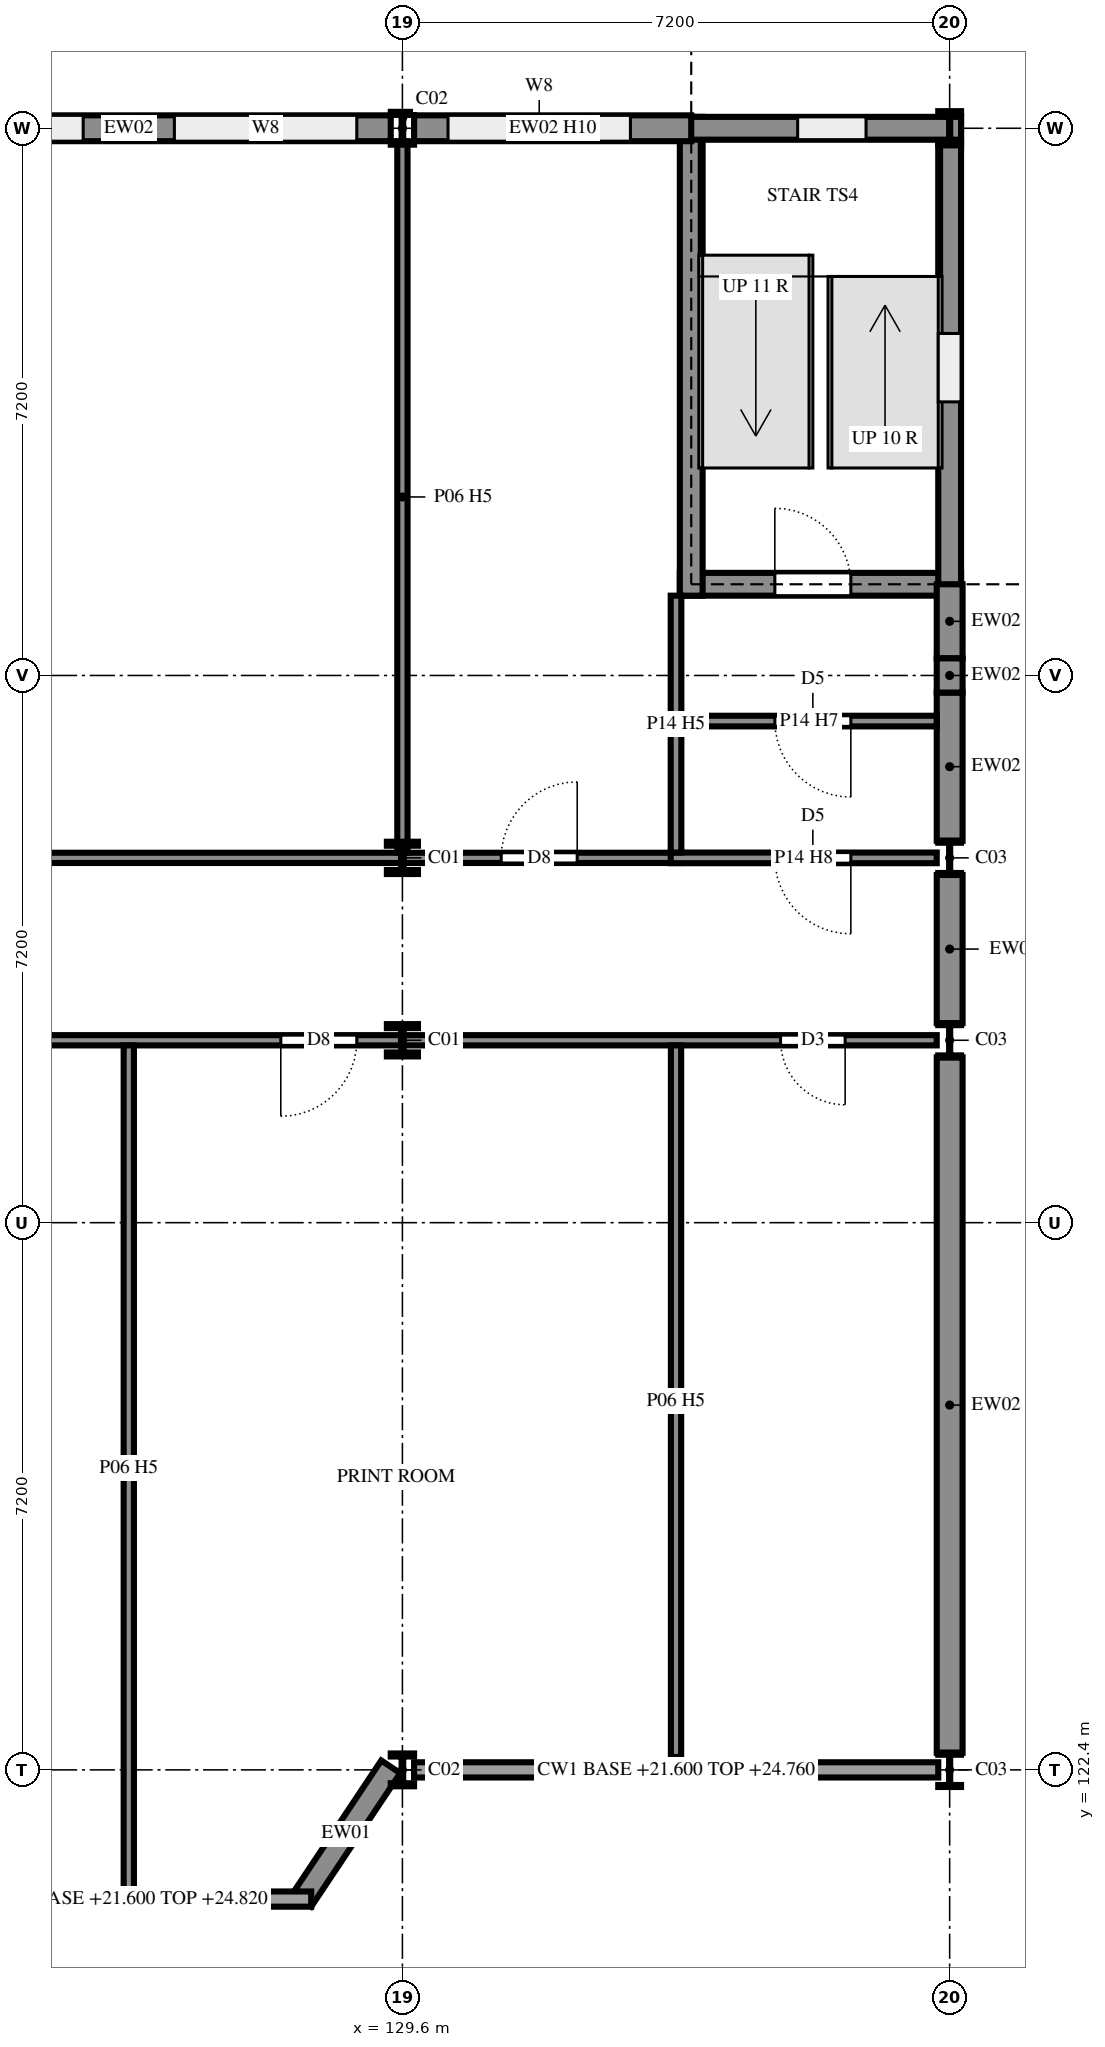
"""IFC4 building model, lengths in metres.
Left out: names, types, materials, properties, quantities, classifications, styles, units other than length and angle.
Written with IfcOpenShell. Run it as: python <this file> out.ifc"""

import sys

from ifc_helpers import new_model, si_unit, direction, frame, frame_2d, origin, origin_2d, place, context, subcontext, project, spatial, rectangle, i_section, extrude, element, fill, save


model = new_model("IFC4")
c1 = context("Model", 3, precision=1e-05, world=origin(), true_north=direction((0.0, 1.0)))
c2 = subcontext(c1, "Body", "Model", "MODEL_VIEW")
j1 = project(units=[si_unit("LENGTHUNIT", "METRE"), si_unit("PLANEANGLEUNIT", "RADIAN")], contexts=[c1])
p1 = place(None, origin())
s1 = spatial("IfcSite", under=j1, at=p1, CompositionType="ELEMENT")
p2 = place(p1, origin())
s2 = spatial("IfcBuilding", under=s1, at=p2, CompositionType="ELEMENT")
p3 = place(p2, frame((0.0, 0.0, 21.6)))
s3 = spatial("IfcBuildingStorey", under=s2, at=p3, CompositionType="ELEMENT", Elevation=21.6)
p4 = place(p3, frame((129.6, 122.4, 0.0), z_axis=(0.0, 0.0, 1.0), x_axis=(1.0, 0.0, 0.0)))
e1 = element("IfcColumn", 1, at=p4, inside=s3, PredefinedType="COLUMN", context=c2, shape_type="SweptSolid", body=[
    extrude(i_section(OverallWidth=0.307, OverallDepth=0.432, WebThickness=0.021, FlangeThickness=0.04, FilletRadius=0.027, at=origin_2d()), origin(), (0.0, 0.0, 1.0), 3.6),
])
for number, where, z_axis, x_axis in (
    (2, (129.6, 132.0, 0.0), (0.0, 0.0, 1.0), (1.0, 0.0, 0.0)),
    (3, (129.6, 134.4, 0.0), (0.0, 0.0, 1.0), (1.0, 0.0, 0.0)),
):
    element("IfcColumn", number, at=place(p3, frame(where, z_axis=z_axis, x_axis=x_axis)), inside=s3, PredefinedType="COLUMN", context=c2, shape_type="SweptSolid", body=[
        extrude(i_section(OverallWidth=0.409, OverallDepth=0.425, WebThickness=0.033, FlangeThickness=0.052, FilletRadius=0.015, at=origin_2d()), origin(), (0.0, 0.0, 1.0), 3.6),
    ])
p5 = place(p3, frame((129.6, 144.0, 0.0), z_axis=(0.0, 0.0, 1.0), x_axis=(1.0, 0.0, 0.0)))
e4 = element("IfcColumn", 4, at=p5, inside=s3, PredefinedType="COLUMN", context=c2, shape_type="SweptSolid", body=[
    extrude(i_section(OverallWidth=0.307, OverallDepth=0.432, WebThickness=0.021, FlangeThickness=0.04, FilletRadius=0.027, at=origin_2d()), origin(), (0.0, 0.0, 1.0), 3.6),
])
for number, where, z_axis, x_axis in (
    (5, (136.8, 122.4, 0.0), (0.0, 0.0, 1.0), (1.0, 0.0, 0.0)),
    (6, (136.8, 132.0, 0.0), (0.0, 0.0, 1.0), (1.0, 0.0, 0.0)),
    (7, (136.8, 134.4, 0.0), (0.0, 0.0, 1.0), (1.0, 0.0, 0.0)),
    (8, (136.8, 144.0, 0.0), (0.0, 0.0, 1.0), (1.0, 0.0, 0.0)),
):
    element("IfcColumn", number, at=place(p3, frame(where, z_axis=z_axis, x_axis=x_axis)), inside=s3, PredefinedType="COLUMN", context=c2, shape_type="SweptSolid", body=[
        extrude(i_section(OverallWidth=0.3, OverallDepth=0.45, WebThickness=0.014, FlangeThickness=0.026, FilletRadius=0.027, at=origin_2d()), origin(), (0.0, 0.0, 1.0), 3.6),
    ])
p6 = place(p3, frame((133.25, 138.0, 0.0), z_axis=(0.0, 0.0, 1.0), x_axis=(1.0, 0.0, 0.0)))
e9 = element("IfcWall", 9, at=p6, inside=s3, PredefinedType="SHEAR", context=c2, shape_type="SweptSolid", body=[
    extrude(rectangle(XDim=3.7, YDim=0.3, at=frame_2d((1.85, 0.0))), origin(), (0.0, 0.0, 1.0), 3.6),
])
p7 = place(p6, frame((1.25, 0.0, 0.0)))
e10 = element("IfcOpeningElement", 10, at=p7, cuts=e9, PredefinedType="OPENING", context=c2, shape_type="SweptSolid", body=[
    extrude(rectangle(XDim=1.0, YDim=2.1, at=frame_2d((0.5, 1.05))), frame((0.0, 0.16, 0.0), z_axis=(0.0, -1.0, 0.0), x_axis=(1.0, 0.0, 0.0)), (0.0, 0.0, 1.0), 0.32),
])
p8 = place(p3, frame((136.8, 137.85, 0.0), z_axis=(0.0, 0.0, 1.0), x_axis=(0.0, 1.0, 0.0)))
e11 = element("IfcWall", 11, at=p8, inside=s3, PredefinedType="SHEAR", context=c2, shape_type="SweptSolid", body=[
    extrude(rectangle(XDim=6.3, YDim=0.3, at=frame_2d((3.15, 0.0))), origin(), (0.0, 0.0, 1.0), 3.6),
])
p9 = place(p8, frame((2.55, 0.0, 0.6)))
e12 = element("IfcOpeningElement", 12, at=p9, cuts=e11, PredefinedType="OPENING", context=c2, shape_type="SweptSolid", body=[
    extrude(rectangle(XDim=0.9, YDim=2.1, at=frame_2d((0.45, 1.05))), frame((0.0, 0.16, 0.0), z_axis=(0.0, -1.0, 0.0), x_axis=(1.0, 0.0, 0.0)), (0.0, 0.0, 1.0), 0.32),
])
p10 = place(p3, frame((133.4, 144.15, 0.0), z_axis=(0.0, 0.0, 1.0), x_axis=(0.0, -1.0, 0.0)))
e13 = element("IfcWall", 13, at=p10, inside=s3, PredefinedType="SHEAR", context=c2, shape_type="SweptSolid", body=[
    extrude(rectangle(XDim=6.3, YDim=0.3, at=frame_2d((3.15, 0.0))), origin(), (0.0, 0.0, 1.0), 3.6),
])
p11 = place(p3, frame((136.95, 144.0, 0.0), z_axis=(0.0, 0.0, 1.0), x_axis=(-1.0, 0.0, 0.0)))
e14 = element("IfcWall", 14, at=p11, inside=s3, PredefinedType="SHEAR", context=c2, shape_type="SweptSolid", body=[
    extrude(rectangle(XDim=3.7, YDim=0.3, at=frame_2d((1.85, 0.0))), origin(), (0.0, 0.0, 1.0), 3.6),
])
p12 = place(p11, frame((1.25, 0.0, 0.6)))
e15 = element("IfcOpeningElement", 15, at=p12, cuts=e14, PredefinedType="OPENING", context=c2, shape_type="SweptSolid", body=[
    extrude(rectangle(XDim=0.9, YDim=2.1, at=frame_2d((0.45, 1.05))), frame((0.0, 0.16, 0.0), z_axis=(0.0, -1.0, 0.0), x_axis=(1.0, 0.0, 0.0)), (0.0, 0.0, 1.0), 0.32),
])
p13 = place(p3, frame((136.8, 122.625, 0.0), z_axis=(0.0, 0.0, 1.0), x_axis=(0.0, 1.0, 0.0)))
e16 = element("IfcWall", 16, at=p13, inside=s3, PredefinedType="SOLIDWALL", context=c2, shape_type="SweptSolid", body=[
    extrude(rectangle(XDim=9.15, YDim=0.34, at=frame_2d((4.575, 0.0))), origin(), (0.0, 0.0, 1.0), 3.06),
])
p14 = place(p3, frame((136.8, 132.225, 0.0), z_axis=(0.0, 0.0, 1.0), x_axis=(0.0, 1.0, 0.0)))
e17 = element("IfcWall", 17, at=p14, inside=s3, PredefinedType="SOLIDWALL", context=c2, shape_type="SweptSolid", body=[
    extrude(rectangle(XDim=1.95, YDim=0.34, at=frame_2d((0.975, 0.0))), origin(), (0.0, 0.0, 1.0), 3.26),
])
p15 = place(p3, frame((136.8, 134.625, 0.0), z_axis=(0.0, 0.0, 1.0), x_axis=(0.0, 1.0, 0.0)))
e18 = element("IfcWall", 18, at=p15, inside=s3, PredefinedType="SOLIDWALL", context=c2, shape_type="SweptSolid", body=[
    extrude(rectangle(XDim=1.95, YDim=0.34, at=frame_2d((0.975, 0.0))), origin(), (0.0, 0.0, 1.0), 3.46),
])
p16 = place(p3, frame((136.8, 137.025, 0.0), z_axis=(0.0, 0.0, 1.0), x_axis=(0.0, 1.0, 0.0)))
e19 = element("IfcWall", 19, at=p16, inside=s3, PredefinedType="SOLIDWALL", context=c2, shape_type="SweptSolid", body=[
    extrude(rectangle(XDim=0.975, YDim=0.34, at=frame_2d((0.488, 0.0))), origin(), (0.0, 0.0, 1.0), 3.46),
])
p17 = place(p3, frame((133.4, 144.0, 0.0), z_axis=(0.0, 0.0, 1.0), x_axis=(-1.0, 0.0, 0.0)))
e20 = element("IfcWall", 20, at=p17, inside=s3, PredefinedType="SOLIDWALL", context=c2, shape_type="SweptSolid", body=[
    extrude(rectangle(XDim=3.646, YDim=0.34, at=frame_2d((1.823, 0.0))), origin(), (0.0, 0.0, 1.0), 3.26),
])
p18 = place(p17, frame((0.8, 0.0, 0.9)))
e21 = element("IfcOpeningElement", 21, at=p18, cuts=e20, PredefinedType="OPENING", context=c2, shape_type="SweptSolid", body=[
    extrude(rectangle(XDim=2.4, YDim=1.8, at=frame_2d((1.2, 0.9))), frame((0.0, 0.18, 0.0), z_axis=(0.0, -1.0, 0.0), x_axis=(1.0, 0.0, 0.0)), (0.0, 0.0, 1.0), 0.36),
])
p19 = place(p3, frame((129.447, 144.0, 0.0), z_axis=(0.0, 0.0, 1.0), x_axis=(-1.0, 0.0, 0.0)))
e22 = element("IfcWall", 22, at=p19, inside=s3, PredefinedType="SOLIDWALL", context=c2, shape_type="SweptSolid", body=[
    extrude(rectangle(XDim=6.893, YDim=0.34, at=frame_2d((3.447, 0.0))), origin(), (0.0, 0.0, 1.0), 3.16),
])
p20 = place(p19, frame((4.046, 0.0, 0.9)))
e23 = element("IfcOpeningElement", 23, at=p20, cuts=e22, PredefinedType="OPENING", context=c2, shape_type="SweptSolid", body=[
    extrude(rectangle(XDim=2.4, YDim=1.8, at=frame_2d((1.2, 0.9))), frame((0.0, 0.18, 0.0), z_axis=(0.0, -1.0, 0.0), x_axis=(1.0, 0.0, 0.0)), (0.0, 0.0, 1.0), 0.36),
])
p21 = place(p19, frame((0.447, 0.0, 0.9)))
e24 = element("IfcOpeningElement", 24, at=p21, cuts=e22, PredefinedType="OPENING", context=c2, shape_type="SweptSolid", body=[
    extrude(rectangle(XDim=2.4, YDim=1.8, at=frame_2d((1.2, 0.9))), frame((0.0, 0.18, 0.0), z_axis=(0.0, -1.0, 0.0), x_axis=(1.0, 0.0, 0.0)), (0.0, 0.0, 1.0), 0.36),
])
p22 = place(p3, frame((129.447, 122.44, 0.0), z_axis=(0.0, 0.0, 1.0), x_axis=(-0.554700196225, -0.832050294338, 0.0)))
e25 = element("IfcWall", 25, at=p22, inside=s3, PredefinedType="SOLIDWALL", context=c2, shape_type="SweptSolid", body=[
    extrude(rectangle(XDim=2.112, YDim=0.3, at=frame_2d((1.056, 0.0))), origin(), (0.0, 0.0, 1.0), 3.22),
])
p23 = place(p3, frame((136.8, 136.575, 0.0), z_axis=(0.0, 0.0, 1.0), x_axis=(0.0, 1.0, 0.0)))
e26 = element("IfcWall", 26, at=p23, inside=s3, PredefinedType="SOLIDWALL", context=c2, shape_type="SweptSolid", body=[
    extrude(rectangle(XDim=0.45, YDim=0.34, at=frame_2d((0.225, 0.0))), origin(), (0.0, 0.0, 1.0), 3.46),
])
p24 = place(p3, frame((108.2, 132.0, 0.0), z_axis=(0.0, 0.0, 1.0), x_axis=(1.0, 0.0, 0.0)))
e27 = element("IfcWall", 27, at=p24, inside=s3, PredefinedType="PARTITIONING", context=c2, shape_type="SweptSolid", body=[
    extrude(rectangle(XDim=28.43, YDim=0.135, at=frame_2d((14.215, 0.0))), origin(), (0.0, 0.0, 1.0), 3.16),
])
p25 = place(p24, frame((26.375, 0.0, 0.0)))
e28 = element("IfcOpeningElement", 28, at=p25, cuts=e27, PredefinedType="OPENING", context=c2, shape_type="SweptSolid", body=[
    extrude(rectangle(XDim=0.85, YDim=2.1, at=frame_2d((0.425, 1.05))), frame((0.0, 0.077, 0.0), z_axis=(0.0, -1.0, 0.0), x_axis=(1.0, 0.0, 0.0)), (0.0, 0.0, 1.0), 0.155),
])
p26 = place(p24, frame((3.4, 0.0, 0.0)))
e29 = element("IfcOpeningElement", 29, at=p26, cuts=e27, PredefinedType="OPENING", context=c2, shape_type="SweptSolid", body=[
    extrude(rectangle(XDim=1.8, YDim=2.1, at=frame_2d((0.9, 1.05))), frame((0.0, 0.077, 0.0), z_axis=(0.0, -1.0, 0.0), x_axis=(1.0, 0.0, 0.0)), (0.0, 0.0, 1.0), 0.155),
])
p27 = place(p24, frame((11.8, 0.0, 0.0)))
e30 = element("IfcOpeningElement", 30, at=p27, cuts=e27, PredefinedType="OPENING", context=c2, shape_type="SweptSolid", body=[
    extrude(rectangle(XDim=1.8, YDim=2.1, at=frame_2d((0.9, 1.05))), frame((0.0, 0.077, 0.0), z_axis=(0.0, -1.0, 0.0), x_axis=(1.0, 0.0, 0.0)), (0.0, 0.0, 1.0), 0.155),
])
p28 = place(p24, frame((19.8, 0.0, 0.0)))
e31 = element("IfcOpeningElement", 31, at=p28, cuts=e27, PredefinedType="OPENING", context=c2, shape_type="SweptSolid", body=[
    extrude(rectangle(XDim=1.0, YDim=2.4, at=frame_2d((0.5, 1.2))), frame((0.0, 0.077, 0.0), z_axis=(0.0, -1.0, 0.0), x_axis=(1.0, 0.0, 0.0)), (0.0, 0.0, 1.0), 0.155),
])
p29 = place(p3, frame((108.2, 134.4, 0.0), z_axis=(0.0, 0.0, 1.0), x_axis=(1.0, 0.0, 0.0)))
e32 = element("IfcWall", 32, at=p29, inside=s3, PredefinedType="PARTITIONING", context=c2, shape_type="SweptSolid", body=[
    extrude(rectangle(XDim=25.07, YDim=0.135, at=frame_2d((12.535, 0.0))), origin(), (0.0, 0.0, 1.0), 3.16),
])
p30 = place(p29, frame((22.7, 0.0, 0.0)))
e33 = element("IfcOpeningElement", 33, at=p30, cuts=e32, PredefinedType="OPENING", context=c2, shape_type="SweptSolid", body=[
    extrude(rectangle(XDim=1.0, YDim=2.4, at=frame_2d((0.5, 1.2))), frame((0.0, 0.077, 0.0), z_axis=(0.0, -1.0, 0.0), x_axis=(1.0, 0.0, 0.0)), (0.0, 0.0, 1.0), 0.155),
])
p31 = place(p3, frame((133.13, 134.4, 0.0), z_axis=(0.0, 0.0, 1.0), x_axis=(1.0, 0.0, 0.0)))
e34 = element("IfcWall", 34, at=p31, inside=s3, PredefinedType="PARTITIONING", context=c2, shape_type="SweptSolid", body=[
    extrude(rectangle(XDim=3.5, YDim=0.14, at=frame_2d((1.75, 0.0))), origin(), (0.0, 0.0, 1.0), 3.16),
])
p32 = place(p31, frame((1.37, 0.0, 0.0)))
e35 = element("IfcOpeningElement", 35, at=p32, cuts=e34, PredefinedType="OPENING", context=c2, shape_type="SweptSolid", body=[
    extrude(rectangle(XDim=1.0, YDim=2.1, at=frame_2d((0.5, 1.05))), frame((0.0, 0.08, 0.0), z_axis=(0.0, -1.0, 0.0), x_axis=(1.0, 0.0, 0.0)), (0.0, 0.0, 1.0), 0.16),
])
p33 = place(p3, frame((133.27, 136.2, 0.0), z_axis=(0.0, 0.0, 1.0), x_axis=(1.0, 0.0, 0.0)))
e36 = element("IfcWall", 36, at=p33, inside=s3, PredefinedType="PARTITIONING", context=c2, shape_type="SweptSolid", body=[
    extrude(rectangle(XDim=3.36, YDim=0.14, at=frame_2d((1.68, 0.0))), origin(), (0.0, 0.0, 1.0), 3.46),
])
p34 = place(p33, frame((1.23, 0.0, 0.0)))
e37 = element("IfcOpeningElement", 37, at=p34, cuts=e36, PredefinedType="OPENING", context=c2, shape_type="SweptSolid", body=[
    extrude(rectangle(XDim=1.0, YDim=2.1, at=frame_2d((0.5, 1.05))), frame((0.0, 0.08, 0.0), z_axis=(0.0, -1.0, 0.0), x_axis=(1.0, 0.0, 0.0)), (0.0, 0.0, 1.0), 0.16),
])
p35 = place(p3, frame((126.0, 120.8, 0.0), z_axis=(0.0, 0.0, 1.0), x_axis=(0.0, 1.0, 0.0)))
e38 = element("IfcWall", 38, at=p35, inside=s3, PredefinedType="PARTITIONING", context=c2, shape_type="SweptSolid", body=[
    extrude(rectangle(XDim=11.133, YDim=0.135, at=frame_2d((5.566, 0.0))), origin(), (0.0, 0.0, 1.0), 3.06),
])
for number, where, z_axis, x_axis in (
    (39, (129.6, 134.468, 0.0), (0.0, 0.0, 1.0), (0.0, 1.0, 0.0)),
    (40, (133.2, 122.57, 0.0), (0.0, 0.0, 1.0), (0.0, 1.0, 0.0)),
):
    element("IfcWall", number, at=place(p3, frame(where, z_axis=z_axis, x_axis=x_axis)), inside=s3, PredefinedType="PARTITIONING", context=c2, shape_type="SweptSolid", body=[
        extrude(rectangle(XDim=9.363, YDim=0.135, at=frame_2d((4.681, 0.0))), origin(), (0.0, 0.0, 1.0), 3.06),
    ])
p36 = place(p3, frame((133.2, 134.47, 0.0), z_axis=(0.0, 0.0, 1.0), x_axis=(0.0, 1.0, 0.0)))
e41 = element("IfcWall", 41, at=p36, inside=s3, PredefinedType="PARTITIONING", context=c2, shape_type="SweptSolid", body=[
    extrude(rectangle(XDim=3.38, YDim=0.14, at=frame_2d((1.69, 0.0))), origin(), (0.0, 0.0, 1.0), 3.06),
])
p37 = place(p18, origin())
e42 = element("IfcWindow", 42, at=p37, inside=s3, PartitioningType="SINGLE_PANEL", PredefinedType="WINDOW", context=c2, shape_type="SweptSolid", body=[
    extrude(rectangle(XDim=2.4, YDim=1.8, at=frame_2d((1.2, 0.9))), frame((0.0, 0.03, 0.0), z_axis=(0.0, -1.0, 0.0), x_axis=(1.0, 0.0, 0.0)), (0.0, 0.0, 1.0), 0.06),
])
fill(e21, e42)
p38 = place(p20, origin())
e43 = element("IfcWindow", 43, at=p38, inside=s3, PartitioningType="SINGLE_PANEL", PredefinedType="WINDOW", context=c2, shape_type="SweptSolid", body=[
    extrude(rectangle(XDim=2.4, YDim=1.8, at=frame_2d((1.2, 0.9))), frame((0.0, 0.03, 0.0), z_axis=(0.0, -1.0, 0.0), x_axis=(1.0, 0.0, 0.0)), (0.0, 0.0, 1.0), 0.06),
])
fill(e23, e43)
p39 = place(p21, origin())
e44 = element("IfcWindow", 44, at=p39, inside=s3, PartitioningType="SINGLE_PANEL", PredefinedType="WINDOW", context=c2, shape_type="SweptSolid", body=[
    extrude(rectangle(XDim=2.4, YDim=1.8, at=frame_2d((1.2, 0.9))), frame((0.0, 0.03, 0.0), z_axis=(0.0, -1.0, 0.0), x_axis=(1.0, 0.0, 0.0)), (0.0, 0.0, 1.0), 0.06),
])
fill(e24, e44)
p40 = place(p9, origin())
e45 = element("IfcWindow", 45, at=p40, inside=s3, PartitioningType="SINGLE_PANEL", PredefinedType="WINDOW", context=c2, shape_type="SweptSolid", body=[
    extrude(rectangle(XDim=0.9, YDim=2.1, at=frame_2d((0.45, 1.05))), frame((0.0, 0.03, 0.0), z_axis=(0.0, -1.0, 0.0), x_axis=(1.0, 0.0, 0.0)), (0.0, 0.0, 1.0), 0.06),
])
fill(e12, e45)
p41 = place(p12, origin())
e46 = element("IfcWindow", 46, at=p41, inside=s3, PartitioningType="SINGLE_PANEL", PredefinedType="WINDOW", context=c2, shape_type="SweptSolid", body=[
    extrude(rectangle(XDim=0.9, YDim=2.1, at=frame_2d((0.45, 1.05))), frame((0.0, 0.03, 0.0), z_axis=(0.0, -1.0, 0.0), x_axis=(1.0, 0.0, 0.0)), (0.0, 0.0, 1.0), 0.06),
])
fill(e15, e46)
p42 = place(p25, frame((0.85, 0.0, 0.0), z_axis=(0.0, 0.0, 1.0), x_axis=(-1.0, 0.0, 0.0)))
e47 = element("IfcDoor", 47, at=p42, inside=s3, OperationType="SINGLE_SWING_RIGHT", PredefinedType="DOOR", context=c2, shape_type="SweptSolid", body=[
    extrude(rectangle(XDim=0.85, YDim=2.1, at=frame_2d((0.425, 1.05))), frame((0.0, 0.025, 0.0), z_axis=(0.0, -1.0, 0.0), x_axis=(1.0, 0.0, 0.0)), (0.0, 0.0, 1.0), 0.05),
])
fill(e28, e47)
p43 = place(p28, frame((1.0, 0.0, 0.0), z_axis=(0.0, 0.0, 1.0), x_axis=(-1.0, 0.0, 0.0)))
e48 = element("IfcDoor", 48, at=p43, inside=s3, OperationType="SINGLE_SWING_LEFT", PredefinedType="DOOR", context=c2, shape_type="SweptSolid", body=[
    extrude(rectangle(XDim=1.0, YDim=2.4, at=frame_2d((0.5, 1.2))), frame((0.0, 0.025, 0.0), z_axis=(0.0, -1.0, 0.0), x_axis=(1.0, 0.0, 0.0)), (0.0, 0.0, 1.0), 0.05),
])
fill(e31, e48)
p44 = place(p30, origin())
e49 = element("IfcDoor", 49, at=p44, inside=s3, OperationType="SINGLE_SWING_LEFT", PredefinedType="DOOR", context=c2, shape_type="SweptSolid", body=[
    extrude(rectangle(XDim=1.0, YDim=2.4, at=frame_2d((0.5, 1.2))), frame((0.0, 0.025, 0.0), z_axis=(0.0, -1.0, 0.0), x_axis=(1.0, 0.0, 0.0)), (0.0, 0.0, 1.0), 0.05),
])
fill(e33, e49)
p45 = place(p32, frame((1.0, 0.0, 0.0), z_axis=(0.0, 0.0, 1.0), x_axis=(-1.0, 0.0, 0.0)))
e50 = element("IfcDoor", 50, at=p45, inside=s3, OperationType="SINGLE_SWING_RIGHT", PredefinedType="DOOR", context=c2, shape_type="SweptSolid", body=[
    extrude(rectangle(XDim=1.0, YDim=2.1, at=frame_2d((0.5, 1.05))), frame((0.0, 0.025, 0.0), z_axis=(0.0, -1.0, 0.0), x_axis=(1.0, 0.0, 0.0)), (0.0, 0.0, 1.0), 0.05),
])
fill(e35, e50)
p46 = place(p34, frame((1.0, 0.0, 0.0), z_axis=(0.0, 0.0, 1.0), x_axis=(-1.0, 0.0, 0.0)))
e51 = element("IfcDoor", 51, at=p46, inside=s3, OperationType="SINGLE_SWING_RIGHT", PredefinedType="DOOR", context=c2, shape_type="SweptSolid", body=[
    extrude(rectangle(XDim=1.0, YDim=2.1, at=frame_2d((0.5, 1.05))), frame((0.0, 0.025, 0.0), z_axis=(0.0, -1.0, 0.0), x_axis=(1.0, 0.0, 0.0)), (0.0, 0.0, 1.0), 0.05),
])
fill(e37, e51)
p47 = place(p7, origin())
e52 = element("IfcDoor", 52, at=p47, inside=s3, OperationType="SINGLE_SWING_RIGHT", PredefinedType="DOOR", context=c2, shape_type="SweptSolid", body=[
    extrude(rectangle(XDim=1.0, YDim=2.1, at=frame_2d((0.5, 1.05))), frame((0.0, 0.025, 0.0), z_axis=(0.0, -1.0, 0.0), x_axis=(1.0, 0.0, 0.0)), (0.0, 0.0, 1.0), 0.05),
])
fill(e10, e52)
save(model, sys.argv[1])
